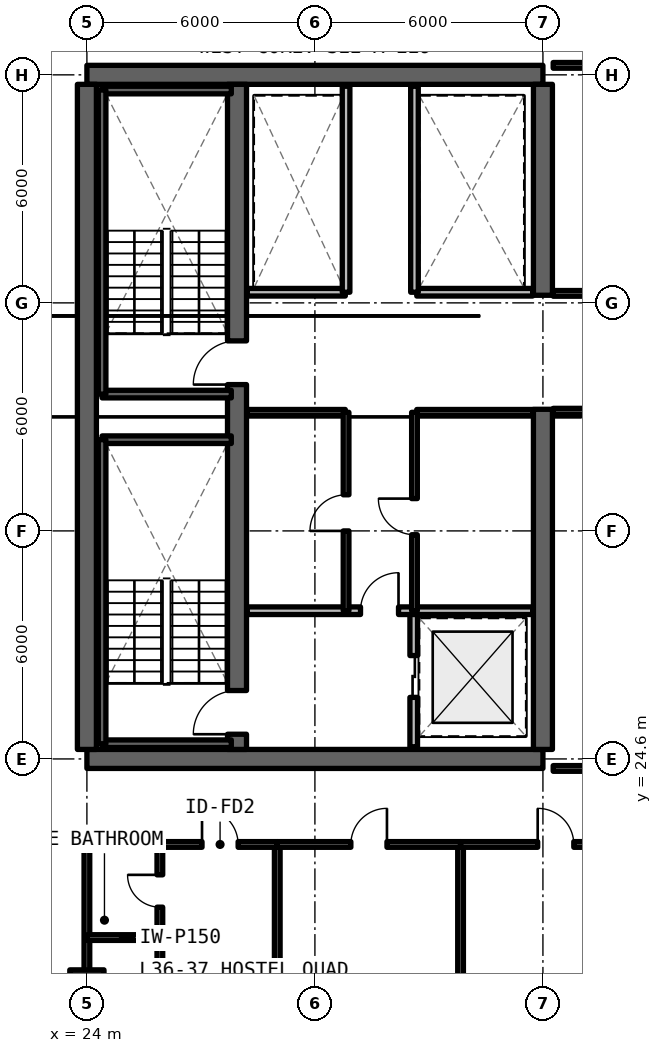
"""IFC4 building model, lengths in metres.
Left out: names, types, materials, properties, quantities, classifications, styles, units other than length and angle.
Written with IfcOpenShell. Run it as: python <this file> out.ifc"""

import sys

from ifc_helpers import new_model, si_unit, direction, frame, frame_2d, origin, origin_2d, place, context, subcontext, project, spatial, rectangle, extrude, element, fill, save


model = new_model("IFC4")
c1 = context("Model", 3, precision=1e-05, world=origin(), true_north=direction((0.0, 1.0)))
c2 = subcontext(c1, "Body", "Model", "MODEL_VIEW")
j1 = project(units=[si_unit("LENGTHUNIT", "METRE"), si_unit("PLANEANGLEUNIT", "RADIAN")], contexts=[c1])
p1 = place(None, origin())
s1 = spatial("IfcSite", under=j1, at=p1, CompositionType="ELEMENT")
p2 = place(p1, origin())
s2 = spatial("IfcBuilding", under=s1, at=p2, CompositionType="ELEMENT")
p3 = place(p2, frame((0.0, 0.0, 132.0)))
s3 = spatial("IfcBuildingStorey", under=s2, at=p3, CompositionType="ELEMENT", Elevation=132.0)
for number, where, z_axis, x_axis in (
    (1, (24.0, 24.6, 0.0), (0.0, 0.0, 1.0), (1.0, 0.0, 0.0)),
    (2, (36.0, 42.6, 0.0), (0.0, 0.0, 1.0), (-1.0, 0.0, 0.0)),
):
    element("IfcWall", number, at=place(p3, frame(where, z_axis=z_axis, x_axis=x_axis)), inside=s3, PredefinedType="SHEAR", context=c2, shape_type="SweptSolid", body=[
        extrude(rectangle(XDim=12.0, YDim=0.5, at=frame_2d((6.0, 0.0))), origin(), (0.0, 0.0, 1.0), 3.3),
    ])
p4 = place(p3, frame((24.0, 24.85, 0.0), z_axis=(0.0, 0.0, 1.0), x_axis=(0.0, 1.0, 0.0)))
e3 = element("IfcWall", 3, at=p4, inside=s3, PredefinedType="SHEAR", context=c2, shape_type="SweptSolid", body=[
    extrude(rectangle(XDim=17.5, YDim=0.5, at=frame_2d((8.75, 0.0))), origin(), (0.0, 0.0, 1.0), 3.3),
])
p5 = place(p3, frame((36.0, 24.85, 0.0), z_axis=(0.0, 0.0, 1.0), x_axis=(0.0, 1.0, 0.0)))
e4 = element("IfcWall", 4, at=p5, inside=s3, PredefinedType="SHEAR", context=c2, shape_type="SweptSolid", body=[
    extrude(rectangle(XDim=8.95, YDim=0.5, at=frame_2d((4.475, 0.0))), origin(), (0.0, 0.0, 1.0), 3.3),
])
p6 = place(p3, frame((36.0, 36.8, 0.0), z_axis=(0.0, 0.0, 1.0), x_axis=(0.0, 1.0, 0.0)))
e5 = element("IfcWall", 5, at=p6, inside=s3, PredefinedType="SHEAR", context=c2, shape_type="SweptSolid", body=[
    extrude(rectangle(XDim=5.55, YDim=0.5, at=frame_2d((2.775, 0.0))), origin(), (0.0, 0.0, 1.0), 3.3),
])
p7 = place(p3, frame((27.95, 24.85, 0.0), z_axis=(0.0, 0.0, 1.0), x_axis=(0.0, 1.0, 0.0)))
e6 = element("IfcWall", 6, at=p7, inside=s3, PredefinedType="SHEAR", context=c2, shape_type="SweptSolid", body=[
    extrude(rectangle(XDim=17.5, YDim=0.5, at=frame_2d((8.75, 0.0))), origin(), (0.0, 0.0, 1.0), 3.3),
])
p8 = place(p7, frame((0.4, 0.0, 0.0)))
e7 = element("IfcOpeningElement", 7, at=p8, cuts=e6, PredefinedType="OPENING", context=c2, shape_type="SweptSolid", body=[
    extrude(rectangle(XDim=1.15, YDim=2.15, at=frame_2d((0.575, 1.075))), frame((0.0, 0.26, 0.0), z_axis=(0.0, -1.0, 0.0), x_axis=(1.0, 0.0, 0.0)), (0.0, 0.0, 1.0), 0.52),
])
p9 = place(p7, frame((9.6, 0.0, 0.0)))
e8 = element("IfcOpeningElement", 8, at=p9, cuts=e6, PredefinedType="OPENING", context=c2, shape_type="SweptSolid", body=[
    extrude(rectangle(XDim=1.15, YDim=2.15, at=frame_2d((0.575, 1.075))), frame((0.0, 0.26, 0.0), z_axis=(0.0, -1.0, 0.0), x_axis=(1.0, 0.0, 0.0)), (0.0, 0.0, 1.0), 0.52),
])
p10 = place(p3, frame((24.0, 18.6, 0.0), z_axis=(0.0, 0.0, 1.0), x_axis=(1.0, 0.0, 0.0)))
e9 = element("IfcColumn", 9, at=p10, inside=s3, PredefinedType="COLUMN", context=c2, shape_type="SweptSolid", body=[
    extrude(rectangle(XDim=0.9, YDim=0.9, at=origin_2d()), origin(), (0.0, 0.0, 1.0), 3.3),
])
p11 = place(p3, frame((32.6, 24.92, 0.0), z_axis=(0.0, 0.0, 1.0), x_axis=(0.0, 1.0, 0.0)))
e10 = element("IfcWall", 10, at=p11, inside=s3, PredefinedType="SOLIDWALL", context=c2, shape_type="SweptSolid", body=[
    extrude(rectangle(XDim=3.58, YDim=0.2, at=frame_2d((1.79, 0.0))), origin(), (0.0, 0.0, 1.0), 2.35),
])
p12 = place(p11, frame((1.3, 0.0, 0.0)))
e11 = element("IfcOpeningElement", 11, at=p12, cuts=e10, PredefinedType="OPENING", context=c2, shape_type="SweptSolid", body=[
    extrude(rectangle(XDim=1.1, YDim=2.2, at=frame_2d((0.55, 1.1))), frame((0.0, 0.11, 0.0), z_axis=(0.0, -1.0, 0.0), x_axis=(1.0, 0.0, 0.0)), (0.0, 0.0, 1.0), 0.22),
])
p13 = place(p3, frame((28.22, 28.5, 0.0), z_axis=(0.0, 0.0, 1.0), x_axis=(1.0, 0.0, 0.0)))
e12 = element("IfcWall", 12, at=p13, inside=s3, PredefinedType="SOLIDWALL", context=c2, shape_type="SweptSolid", body=[
    extrude(rectangle(XDim=7.51, YDim=0.2, at=frame_2d((3.755, 0.0))), origin(), (0.0, 0.0, 1.0), 2.35),
])
p14 = place(p13, frame((2.98, 0.0, 0.0)))
e13 = element("IfcOpeningElement", 13, at=p14, cuts=e12, PredefinedType="OPENING", context=c2, shape_type="SweptSolid", body=[
    extrude(rectangle(XDim=1.0, YDim=2.15, at=frame_2d((0.5, 1.075))), frame((0.0, 0.11, 0.0), z_axis=(0.0, -1.0, 0.0), x_axis=(1.0, 0.0, 0.0)), (0.0, 0.0, 1.0), 0.22),
])
p15 = place(p3, frame((28.22, 33.72, 0.0), z_axis=(0.0, 0.0, 1.0), x_axis=(1.0, 0.0, 0.0)))
e14 = element("IfcWall", 14, at=p15, inside=s3, PredefinedType="SOLIDWALL", context=c2, shape_type="SweptSolid", body=[
    extrude(rectangle(XDim=2.58, YDim=0.15, at=frame_2d((1.29, 0.0))), origin(), (0.0, 0.0, 1.0), 2.35),
])
p16 = place(p3, frame((30.82, 28.5, 0.0), z_axis=(0.0, 0.0, 1.0), x_axis=(0.0, 1.0, 0.0)))
e15 = element("IfcWall", 15, at=p16, inside=s3, PredefinedType="SOLIDWALL", context=c2, shape_type="SweptSolid", body=[
    extrude(rectangle(XDim=5.22, YDim=0.15, at=frame_2d((2.61, 0.0))), origin(), (0.0, 0.0, 1.0), 2.35),
])
p17 = place(p16, frame((2.1, 0.0, 0.0)))
e16 = element("IfcOpeningElement", 16, at=p17, cuts=e15, PredefinedType="OPENING", context=c2, shape_type="SweptSolid", body=[
    extrude(rectangle(XDim=0.95, YDim=2.15, at=frame_2d((0.475, 1.075))), frame((0.0, 0.085, 0.0), z_axis=(0.0, -1.0, 0.0), x_axis=(1.0, 0.0, 0.0)), (0.0, 0.0, 1.0), 0.17),
])
p18 = place(p3, frame((32.68, 33.72, 0.0), z_axis=(0.0, 0.0, 1.0), x_axis=(1.0, 0.0, 0.0)))
e17 = element("IfcWall", 17, at=p18, inside=s3, PredefinedType="SOLIDWALL", context=c2, shape_type="SweptSolid", body=[
    extrude(rectangle(XDim=3.05, YDim=0.15, at=frame_2d((1.525, 0.0))), origin(), (0.0, 0.0, 1.0), 2.35),
])
p19 = place(p3, frame((32.62, 28.5, 0.0), z_axis=(0.0, 0.0, 1.0), x_axis=(0.0, 1.0, 0.0)))
e18 = element("IfcWall", 18, at=p19, inside=s3, PredefinedType="SOLIDWALL", context=c2, shape_type="SweptSolid", body=[
    extrude(rectangle(XDim=5.22, YDim=0.15, at=frame_2d((2.61, 0.0))), origin(), (0.0, 0.0, 1.0), 2.35),
])
p20 = place(p19, frame((2.0, 0.0, 0.0)))
e19 = element("IfcOpeningElement", 19, at=p20, cuts=e18, PredefinedType="OPENING", context=c2, shape_type="SweptSolid", body=[
    extrude(rectangle(XDim=0.95, YDim=2.15, at=frame_2d((0.475, 1.075))), frame((0.0, 0.085, 0.0), z_axis=(0.0, -1.0, 0.0), x_axis=(1.0, 0.0, 0.0)), (0.0, 0.0, 1.0), 0.17),
])
p21 = place(p3, frame((28.22, 36.88, 0.0), z_axis=(0.0, 0.0, 1.0), x_axis=(1.0, 0.0, 0.0)))
e20 = element("IfcWall", 20, at=p21, inside=s3, PredefinedType="SOLIDWALL", context=c2, shape_type="SweptSolid", body=[
    extrude(rectangle(XDim=2.58, YDim=0.2, at=frame_2d((1.29, 0.0))), origin(), (0.0, 0.0, 1.0), 2.35),
])
p22 = place(p3, frame((30.82, 36.88, 0.0), z_axis=(0.0, 0.0, 1.0), x_axis=(0.0, 1.0, 0.0)))
e21 = element("IfcWall", 21, at=p22, inside=s3, PredefinedType="SOLIDWALL", context=c2, shape_type="SweptSolid", body=[
    extrude(rectangle(XDim=5.42, YDim=0.2, at=frame_2d((2.71, 0.0))), origin(), (0.0, 0.0, 1.0), 2.35),
])
p23 = place(p3, frame((32.68, 36.88, 0.0), z_axis=(0.0, 0.0, 1.0), x_axis=(1.0, 0.0, 0.0)))
e22 = element("IfcWall", 22, at=p23, inside=s3, PredefinedType="SOLIDWALL", context=c2, shape_type="SweptSolid", body=[
    extrude(rectangle(XDim=3.05, YDim=0.2, at=frame_2d((1.525, 0.0))), origin(), (0.0, 0.0, 1.0), 2.35),
])
p24 = place(p3, frame((32.62, 36.88, 0.0), z_axis=(0.0, 0.0, 1.0), x_axis=(0.0, 1.0, 0.0)))
e23 = element("IfcWall", 23, at=p24, inside=s3, PredefinedType="SOLIDWALL", context=c2, shape_type="SweptSolid", body=[
    extrude(rectangle(XDim=5.42, YDim=0.2, at=frame_2d((2.71, 0.0))), origin(), (0.0, 0.0, 1.0), 2.35),
])
p25 = place(p3, frame((36.27, 24.35, 0.0), z_axis=(0.0, 0.0, 1.0), x_axis=(1.0, 0.0, 0.0)))
e24 = element("IfcWall", 24, at=p25, inside=s3, PredefinedType="SOLIDWALL", context=c2, shape_type="SweptSolid", body=[
    extrude(rectangle(XDim=7.88, YDim=0.15, at=frame_2d((3.94, 0.0))), origin(), (0.0, 0.0, 1.0), 2.35),
])
p26 = place(p3, frame((36.27, 33.75, 0.0), z_axis=(0.0, 0.0, 1.0), x_axis=(1.0, 0.0, 0.0)))
e25 = element("IfcWall", 25, at=p26, inside=s3, PredefinedType="SOLIDWALL", context=c2, shape_type="SweptSolid", body=[
    extrude(rectangle(XDim=7.88, YDim=0.15, at=frame_2d((3.94, 0.0))), origin(), (0.0, 0.0, 1.0), 2.35),
])
p27 = place(p26, frame((3.465, 0.0, 0.0)))
e26 = element("IfcOpeningElement", 26, at=p27, cuts=e25, PredefinedType="OPENING", context=c2, shape_type="SweptSolid", body=[
    extrude(rectangle(XDim=0.95, YDim=2.15, at=frame_2d((0.475, 1.075))), frame((0.0, 0.085, 0.0), z_axis=(0.0, -1.0, 0.0), x_axis=(1.0, 0.0, 0.0)), (0.0, 0.0, 1.0), 0.17),
])
p28 = place(p3, frame((36.27, 36.85, 0.0), z_axis=(0.0, 0.0, 1.0), x_axis=(1.0, 0.0, 0.0)))
e27 = element("IfcWall", 27, at=p28, inside=s3, PredefinedType="SOLIDWALL", context=c2, shape_type="SweptSolid", body=[
    extrude(rectangle(XDim=7.88, YDim=0.15, at=frame_2d((3.94, 0.0))), origin(), (0.0, 0.0, 1.0), 2.35),
])
p29 = place(p28, frame((3.465, 0.0, 0.0)))
e28 = element("IfcOpeningElement", 28, at=p29, cuts=e27, PredefinedType="OPENING", context=c2, shape_type="SweptSolid", body=[
    extrude(rectangle(XDim=0.95, YDim=2.15, at=frame_2d((0.475, 1.075))), frame((0.0, 0.085, 0.0), z_axis=(0.0, -1.0, 0.0), x_axis=(1.0, 0.0, 0.0)), (0.0, 0.0, 1.0), 0.17),
])
p30 = place(p3, frame((36.27, 42.85, 0.0), z_axis=(0.0, 0.0, 1.0), x_axis=(1.0, 0.0, 0.0)))
e29 = element("IfcWall", 29, at=p30, inside=s3, PredefinedType="SOLIDWALL", context=c2, shape_type="SweptSolid", body=[
    extrude(rectangle(XDim=7.88, YDim=0.15, at=frame_2d((3.94, 0.0))), origin(), (0.0, 0.0, 1.0), 2.35),
])
for number, where, z_axis, x_axis in (
    (30, (24.0, 12.15, 0.0), (0.0, 0.0, 1.0), (0.0, 1.0, 0.0)),
    (31, (29.009, 12.15, 0.0), (0.0, 0.0, 1.0), (0.0, 1.0, 0.0)),
):
    element("IfcWall", number, at=place(p3, frame(where, z_axis=z_axis, x_axis=x_axis)), inside=s3, PredefinedType="SOLIDWALL", context=c2, shape_type="SweptSolid", body=[
        extrude(rectangle(XDim=10.2, YDim=0.15, at=frame_2d((5.1, 0.0))), origin(), (0.0, 0.0, 1.0), 2.35),
    ])
p31 = place(p3, frame((24.0, 19.9, 0.0), z_axis=(0.0, 0.0, 1.0), x_axis=(1.0, 0.0, 0.0)))
e32 = element("IfcWall", 32, at=p31, inside=s3, PredefinedType="PARTITIONING", context=c2, shape_type="SweptSolid", body=[
    extrude(rectangle(XDim=1.92, YDim=0.15, at=frame_2d((0.96, 0.0))), origin(), (0.0, 0.0, 1.0), 2.35),
])
p32 = place(p3, frame((25.92, 12.15, 0.0), z_axis=(0.0, 0.0, 1.0), x_axis=(0.0, 1.0, 0.0)))
e33 = element("IfcWall", 33, at=p32, inside=s3, PredefinedType="PARTITIONING", context=c2, shape_type="SweptSolid", body=[
    extrude(rectangle(XDim=10.2, YDim=0.15, at=frame_2d((5.1, 0.0))), origin(), (0.0, 0.0, 1.0), 2.35),
])
p33 = place(p32, frame((2.96, 0.0, 0.0)))
e34 = element("IfcOpeningElement", 34, at=p33, cuts=e33, PredefinedType="OPENING", context=c2, shape_type="SweptSolid", body=[
    extrude(rectangle(XDim=0.85, YDim=2.1, at=frame_2d((0.425, 1.05))), frame((0.0, 0.085, 0.0), z_axis=(0.0, -1.0, 0.0), x_axis=(1.0, 0.0, 0.0)), (0.0, 0.0, 1.0), 0.17),
])
p34 = place(p32, frame((8.55, 0.0, 0.0)))
e35 = element("IfcOpeningElement", 35, at=p34, cuts=e33, PredefinedType="OPENING", context=c2, shape_type="SweptSolid", body=[
    extrude(rectangle(XDim=0.85, YDim=2.1, at=frame_2d((0.425, 1.05))), frame((0.0, 0.085, 0.0), z_axis=(0.0, -1.0, 0.0), x_axis=(1.0, 0.0, 0.0)), (0.0, 0.0, 1.0), 0.17),
])
p35 = place(p3, frame((24.0, 22.35, 0.0), z_axis=(0.0, 0.0, 1.0), x_axis=(1.0, 0.0, 0.0)))
e36 = element("IfcWall", 36, at=p35, inside=s3, PredefinedType="SOLIDWALL", context=c2, shape_type="SweptSolid", body=[
    extrude(rectangle(XDim=5.009, YDim=0.15, at=frame_2d((2.504, 0.0))), origin(), (0.0, 0.0, 1.0), 2.35),
])
p36 = place(p35, frame((3.03, 0.0, 0.0)))
e37 = element("IfcOpeningElement", 37, at=p36, cuts=e36, PredefinedType="OPENING", context=c2, shape_type="SweptSolid", body=[
    extrude(rectangle(XDim=0.95, YDim=2.15, at=frame_2d((0.475, 1.075))), frame((0.0, 0.085, 0.0), z_axis=(0.0, -1.0, 0.0), x_axis=(1.0, 0.0, 0.0)), (0.0, 0.0, 1.0), 0.17),
])
p37 = place(p3, frame((33.833, 12.15, 0.0), z_axis=(0.0, 0.0, 1.0), x_axis=(0.0, 1.0, 0.0)))
e38 = element("IfcWall", 38, at=p37, inside=s3, PredefinedType="SOLIDWALL", context=c2, shape_type="SweptSolid", body=[
    extrude(rectangle(XDim=10.2, YDim=0.15, at=frame_2d((5.1, 0.0))), origin(), (0.0, 0.0, 1.0), 2.35),
])
p38 = place(p3, frame((29.009, 22.35, 0.0), z_axis=(0.0, 0.0, 1.0), x_axis=(1.0, 0.0, 0.0)))
e39 = element("IfcWall", 39, at=p38, inside=s3, PredefinedType="SOLIDWALL", context=c2, shape_type="SweptSolid", body=[
    extrude(rectangle(XDim=4.824, YDim=0.15, at=frame_2d((2.412, 0.0))), origin(), (0.0, 0.0, 1.0), 2.35),
])
p39 = place(p38, frame((1.937, 0.0, 0.0)))
e40 = element("IfcOpeningElement", 40, at=p39, cuts=e39, PredefinedType="OPENING", context=c2, shape_type="SweptSolid", body=[
    extrude(rectangle(XDim=0.95, YDim=2.15, at=frame_2d((0.475, 1.075))), frame((0.0, 0.085, 0.0), z_axis=(0.0, -1.0, 0.0), x_axis=(1.0, 0.0, 0.0)), (0.0, 0.0, 1.0), 0.17),
])
p40 = place(p3, frame((33.833, 22.35, 0.0), z_axis=(0.0, 0.0, 1.0), x_axis=(1.0, 0.0, 0.0)))
e41 = element("IfcWall", 41, at=p40, inside=s3, PredefinedType="SOLIDWALL", context=c2, shape_type="SweptSolid", body=[
    extrude(rectangle(XDim=5.009, YDim=0.15, at=frame_2d((2.504, 0.0))), origin(), (0.0, 0.0, 1.0), 2.35),
])
p41 = place(p40, frame((2.03, 0.0, 0.0)))
e42 = element("IfcOpeningElement", 42, at=p41, cuts=e41, PredefinedType="OPENING", context=c2, shape_type="SweptSolid", body=[
    extrude(rectangle(XDim=0.95, YDim=2.15, at=frame_2d((0.475, 1.075))), frame((0.0, 0.085, 0.0), z_axis=(0.0, -1.0, 0.0), x_axis=(1.0, 0.0, 0.0)), (0.0, 0.0, 1.0), 0.17),
])
for number, where, z_axis, x_axis in (
    (43, (24.4, 25.0, 0.0), (0.0, 0.0, 1.0), (1.0, 0.0, 0.0)),
    (44, (27.8, 33.0, 0.0), (0.0, 0.0, 1.0), (-1.0, 0.0, 0.0)),
):
    element("IfcWall", number, at=place(p3, frame(where, z_axis=z_axis, x_axis=x_axis)), inside=s3, PredefinedType="SOLIDWALL", context=c2, shape_type="SweptSolid", body=[
        extrude(rectangle(XDim=3.4, YDim=0.2, at=frame_2d((1.7, 0.0))), origin(), (0.0, 0.0, 1.0), 3.3),
    ])
p42 = place(p3, frame((24.4, 33.0, 0.0), z_axis=(0.0, 0.0, 1.0), x_axis=(0.0, -1.0, 0.0)))
e45 = element("IfcWall", 45, at=p42, inside=s3, PredefinedType="SOLIDWALL", context=c2, shape_type="SweptSolid", body=[
    extrude(rectangle(XDim=8.0, YDim=0.2, at=frame_2d((4.0, 0.0))), origin(), (0.0, 0.0, 1.0), 3.3),
])
for number, where, z_axis, x_axis in (
    (46, (24.4, 34.2, 0.0), (0.0, 0.0, 1.0), (1.0, 0.0, 0.0)),
    (47, (27.8, 42.2, 0.0), (0.0, 0.0, 1.0), (-1.0, 0.0, 0.0)),
):
    element("IfcWall", number, at=place(p3, frame(where, z_axis=z_axis, x_axis=x_axis)), inside=s3, PredefinedType="SOLIDWALL", context=c2, shape_type="SweptSolid", body=[
        extrude(rectangle(XDim=3.4, YDim=0.2, at=frame_2d((1.7, 0.0))), origin(), (0.0, 0.0, 1.0), 3.3),
    ])
p43 = place(p3, frame((24.4, 42.2, 0.0), z_axis=(0.0, 0.0, 1.0), x_axis=(0.0, -1.0, 0.0)))
e48 = element("IfcWall", 48, at=p43, inside=s3, PredefinedType="SOLIDWALL", context=c2, shape_type="SweptSolid", body=[
    extrude(rectangle(XDim=8.0, YDim=0.2, at=frame_2d((4.0, 0.0))), origin(), (0.0, 0.0, 1.0), 3.3),
])
p44 = place(p12, origin())
e49 = element("IfcDoor", 49, at=p44, inside=s3, OperationType="SLIDING_TO_LEFT", PredefinedType="DOOR", context=c2, shape_type="SweptSolid", body=[
    extrude(rectangle(XDim=1.1, YDim=2.2, at=frame_2d((0.55, 1.1))), frame((0.0, 0.025, 0.0), z_axis=(0.0, -1.0, 0.0), x_axis=(1.0, 0.0, 0.0)), (0.0, 0.0, 1.0), 0.05),
])
fill(e11, e49)
p45 = place(p14, origin())
e50 = element("IfcDoor", 50, at=p45, inside=s3, OperationType="SINGLE_SWING_RIGHT", PredefinedType="DOOR", context=c2, shape_type="SweptSolid", body=[
    extrude(rectangle(XDim=1.0, YDim=2.15, at=frame_2d((0.5, 1.075))), frame((0.0, 0.025, 0.0), z_axis=(0.0, -1.0, 0.0), x_axis=(1.0, 0.0, 0.0)), (0.0, 0.0, 1.0), 0.05),
])
fill(e13, e50)
p46 = place(p17, origin())
e51 = element("IfcDoor", 51, at=p46, inside=s3, OperationType="SINGLE_SWING_LEFT", PredefinedType="DOOR", context=c2, shape_type="SweptSolid", body=[
    extrude(rectangle(XDim=0.95, YDim=2.15, at=frame_2d((0.475, 1.075))), frame((0.0, 0.025, 0.0), z_axis=(0.0, -1.0, 0.0), x_axis=(1.0, 0.0, 0.0)), (0.0, 0.0, 1.0), 0.05),
])
fill(e16, e51)
p47 = place(p20, origin())
e52 = element("IfcDoor", 52, at=p47, inside=s3, OperationType="SINGLE_SWING_RIGHT", PredefinedType="DOOR", context=c2, shape_type="SweptSolid", body=[
    extrude(rectangle(XDim=0.95, YDim=2.15, at=frame_2d((0.475, 1.075))), frame((0.0, 0.025, 0.0), z_axis=(0.0, -1.0, 0.0), x_axis=(1.0, 0.0, 0.0)), (0.0, 0.0, 1.0), 0.05),
])
fill(e19, e52)
p48 = place(p34, origin())
e53 = element("IfcDoor", 53, at=p48, inside=s3, OperationType="SINGLE_SWING_RIGHT", PredefinedType="DOOR", context=c2, shape_type="SweptSolid", body=[
    extrude(rectangle(XDim=0.85, YDim=2.1, at=frame_2d((0.425, 1.05))), frame((0.0, 0.025, 0.0), z_axis=(0.0, -1.0, 0.0), x_axis=(1.0, 0.0, 0.0)), (0.0, 0.0, 1.0), 0.05),
])
fill(e35, e53)
p49 = place(p36, origin())
e54 = element("IfcDoor", 54, at=p49, inside=s3, OperationType="SINGLE_SWING_LEFT", PredefinedType="DOOR", context=c2, shape_type="SweptSolid", body=[
    extrude(rectangle(XDim=0.95, YDim=2.15, at=frame_2d((0.475, 1.075))), frame((0.0, 0.025, 0.0), z_axis=(0.0, -1.0, 0.0), x_axis=(1.0, 0.0, 0.0)), (0.0, 0.0, 1.0), 0.05),
])
fill(e37, e54)
p50 = place(p39, origin())
e55 = element("IfcDoor", 55, at=p50, inside=s3, OperationType="SINGLE_SWING_RIGHT", PredefinedType="DOOR", context=c2, shape_type="SweptSolid", body=[
    extrude(rectangle(XDim=0.95, YDim=2.15, at=frame_2d((0.475, 1.075))), frame((0.0, 0.025, 0.0), z_axis=(0.0, -1.0, 0.0), x_axis=(1.0, 0.0, 0.0)), (0.0, 0.0, 1.0), 0.05),
])
fill(e40, e55)
p51 = place(p41, origin())
e56 = element("IfcDoor", 56, at=p51, inside=s3, OperationType="SINGLE_SWING_LEFT", PredefinedType="DOOR", context=c2, shape_type="SweptSolid", body=[
    extrude(rectangle(XDim=0.95, YDim=2.15, at=frame_2d((0.475, 1.075))), frame((0.0, 0.025, 0.0), z_axis=(0.0, -1.0, 0.0), x_axis=(1.0, 0.0, 0.0)), (0.0, 0.0, 1.0), 0.05),
])
fill(e42, e56)
p52 = place(p8, origin())
e57 = element("IfcDoor", 57, at=p52, inside=s3, OperationType="SINGLE_SWING_RIGHT", PredefinedType="DOOR", context=c2, shape_type="SweptSolid", body=[
    extrude(rectangle(XDim=1.15, YDim=2.15, at=frame_2d((0.575, 1.075))), frame((0.0, 0.025, 0.0), z_axis=(0.0, -1.0, 0.0), x_axis=(1.0, 0.0, 0.0)), (0.0, 0.0, 1.0), 0.05),
])
fill(e7, e57)
p53 = place(p9, origin())
e58 = element("IfcDoor", 58, at=p53, inside=s3, OperationType="SINGLE_SWING_LEFT", PredefinedType="DOOR", context=c2, shape_type="SweptSolid", body=[
    extrude(rectangle(XDim=1.15, YDim=2.15, at=frame_2d((0.575, 1.075))), frame((0.0, 0.025, 0.0), z_axis=(0.0, -1.0, 0.0), x_axis=(1.0, 0.0, 0.0)), (0.0, 0.0, 1.0), 0.05),
])
fill(e8, e58)
save(model, sys.argv[1])
